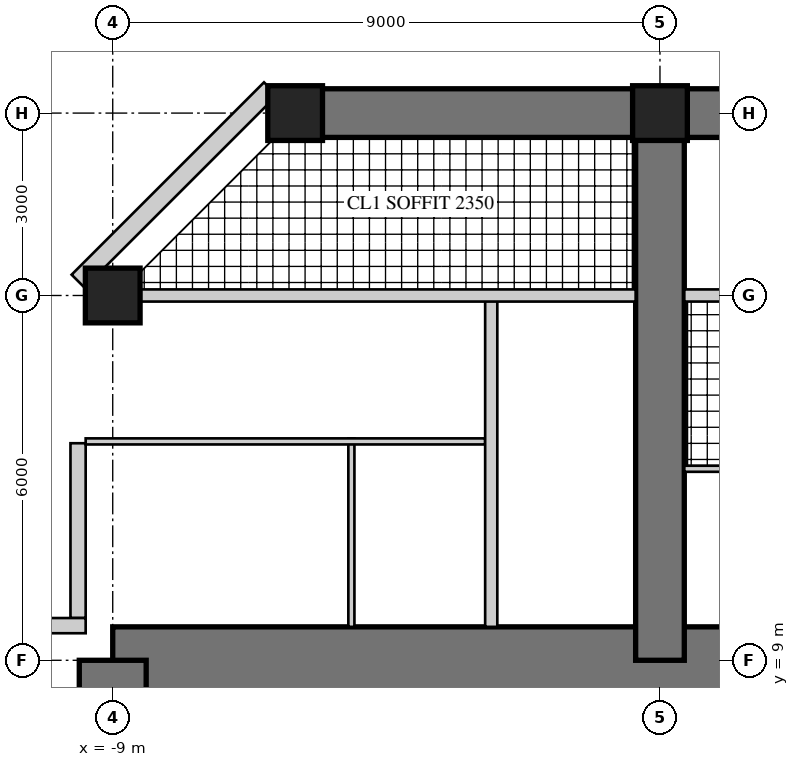
"""IFC4 building model, lengths in metres.
Left out: names, types, materials, properties, quantities, classifications, styles, units other than length and angle.
Written with IfcOpenShell. Run it as: python <this file> out.ifc"""

import sys

from ifc_helpers import new_model, si_unit, direction, frame, frame_2d, origin, origin_2d, place, context, subcontext, project, spatial, rectangle, hollow_rectangle, extrude, element, fill, save


model = new_model("IFC4")
c1 = context("Model", 3, precision=1e-05, world=origin(), true_north=direction((0.0, 1.0)))
c2 = subcontext(c1, "Body", "Model", "MODEL_VIEW")
j1 = project(units=[si_unit("LENGTHUNIT", "METRE"), si_unit("PLANEANGLEUNIT", "RADIAN")], contexts=[c1])
p1 = place(None, origin())
s1 = spatial("IfcSite", under=j1, at=p1, CompositionType="ELEMENT")
p2 = place(p1, origin())
s2 = spatial("IfcBuilding", under=s1, at=p2, CompositionType="ELEMENT")
p3 = place(p2, frame((0.0, 0.0, 206.9)))
s3 = spatial("IfcBuildingStorey", under=s2, at=p3, CompositionType="ELEMENT", Elevation=206.9)
p4 = place(p3, frame((9.0, 9.0, 0.0), z_axis=(0.0, 0.0, 1.0), x_axis=(-1.0, 0.0, 0.0)))
e1 = element("IfcWall", 1, at=p4, inside=s3, PredefinedType="SHEAR", context=c2, shape_type="SweptSolid", body=[
    extrude(rectangle(XDim=18.0, YDim=1.1, at=frame_2d((9.0, 0.0))), origin(), (0.0, 0.0, 1.0), 3.4),
])
p5 = place(p4, frame((9.8, 0.0, 0.0)))
e2 = element("IfcOpeningElement", 2, at=p5, cuts=e1, PredefinedType="OPENING", context=c2, shape_type="SweptSolid", body=[
    extrude(rectangle(XDim=1.0, YDim=2.4, at=frame_2d((0.5, 1.2))), frame((0.0, 0.56, 0.0), z_axis=(0.0, -1.0, 0.0), x_axis=(1.0, 0.0, 0.0)), (0.0, 0.0, 1.0), 1.12),
])
p6 = place(p3, frame((-9.0, 9.0, 0.0), z_axis=(0.0, 0.0, 1.0), x_axis=(0.0, -1.0, 0.0)))
e3 = element("IfcWall", 3, at=p6, inside=s3, PredefinedType="SHEAR", context=c2, shape_type="SweptSolid", body=[
    extrude(rectangle(XDim=18.0, YDim=1.1, at=frame_2d((9.0, 0.0))), origin(), (0.0, 0.0, 1.0), 3.4),
])
p7 = place(p6, frame((9.8, 0.0, 0.0)))
e4 = element("IfcOpeningElement", 4, at=p7, cuts=e3, PredefinedType="OPENING", context=c2, shape_type="SweptSolid", body=[
    extrude(rectangle(XDim=1.0, YDim=2.4, at=frame_2d((0.5, 1.2))), frame((0.0, 0.56, 0.0), z_axis=(0.0, -1.0, 0.0), x_axis=(1.0, 0.0, 0.0)), (0.0, 0.0, 1.0), 1.12),
])
p8 = place(p3, frame((0.0, 9.0, 0.0), z_axis=(0.0, 0.0, 1.0), x_axis=(0.0, 1.0, 0.0)))
e5 = element("IfcWall", 5, at=p8, inside=s3, PredefinedType="SHEAR", context=c2, shape_type="SweptSolid", body=[
    extrude(rectangle(XDim=9.0, YDim=0.8, at=frame_2d((4.5, 0.0))), origin(), (0.0, 0.0, 1.0), 3.4),
])
p9 = place(p8, frame((3.95, 0.0, 0.0)))
e6 = element("IfcOpeningElement", 6, at=p9, cuts=e5, PredefinedType="OPENING", context=c2, shape_type="SweptSolid", body=[
    extrude(rectangle(XDim=1.0, YDim=2.15, at=frame_2d((0.5, 1.075))), frame((0.0, 0.41, 0.0), z_axis=(0.0, -1.0, 0.0), x_axis=(1.0, 0.0, 0.0)), (0.0, 0.0, 1.0), 0.82),
])
p10 = place(p8, frame((7.0, 0.0, 0.0)))
e7 = element("IfcOpeningElement", 7, at=p10, cuts=e5, PredefinedType="OPENING", context=c2, shape_type="SweptSolid", body=[
    extrude(rectangle(XDim=1.0, YDim=2.2, at=frame_2d((0.5, 1.1))), frame((0.0, 0.41, 0.0), z_axis=(0.0, -1.0, 0.0), x_axis=(1.0, 0.0, 0.0)), (0.0, 0.0, 1.0), 0.82),
])
p11 = place(p3, frame((6.0, 18.0, 0.0), z_axis=(0.0, 0.0, 1.0), x_axis=(-1.0, 0.0, 0.0)))
e8 = element("IfcWall", 8, at=p11, inside=s3, PredefinedType="SHEAR", context=c2, shape_type="SweptSolid", body=[
    extrude(rectangle(XDim=12.0, YDim=0.8, at=frame_2d((6.0, 0.0))), origin(), (0.0, 0.0, 1.0), 3.4),
])
p12 = place(p11, frame((1.625, 0.0, 0.6)))
e9 = element("IfcOpeningElement", 9, at=p12, cuts=e8, PredefinedType="OPENING", context=c2, shape_type="SweptSolid", body=[
    extrude(rectangle(XDim=3.0, YDim=2.4, at=frame_2d((1.5, 1.2))), frame((0.0, 0.41, 0.0), z_axis=(0.0, -1.0, 0.0), x_axis=(1.0, 0.0, 0.0)), (0.0, 0.0, 1.0), 0.82),
])
p13 = place(p11, frame((7.375, 0.0, 0.6)))
e10 = element("IfcOpeningElement", 10, at=p13, cuts=e8, PredefinedType="OPENING", context=c2, shape_type="SweptSolid", body=[
    extrude(rectangle(XDim=3.0, YDim=2.4, at=frame_2d((1.5, 1.2))), frame((0.0, 0.41, 0.0), z_axis=(0.0, -1.0, 0.0), x_axis=(1.0, 0.0, 0.0)), (0.0, 0.0, 1.0), 0.82),
])
for number, where, z_axis, x_axis in (
    (11, (-9.0, 15.0, 0.0), (0.0, 0.0, 1.0), (1.0, 0.0, 0.0)),
    (12, (0.0, 18.0, 0.0), (0.0, 0.0, 1.0), (1.0, 0.0, 0.0)),
    (13, (-6.0, 18.0, 0.0), (0.0, 0.0, 1.0), (1.0, 0.0, 0.0)),
):
    element("IfcColumn", number, at=place(p3, frame(where, z_axis=z_axis, x_axis=x_axis)), inside=s3, PredefinedType="COLUMN", context=c2, shape_type="SweptSolid", body=[
        extrude(rectangle(XDim=0.9, YDim=0.9, at=origin_2d()), origin(), (0.0, 0.0, 1.0), 3.4),
    ])
p14 = place(p3, frame((-6.406, 18.4, 0.0), z_axis=(0.0, 0.0, 1.0), x_axis=(-0.707134062067, -0.707079499254, 0.0)))
e14 = element("IfcWall", 14, at=p14, inside=s3, PredefinedType="SOLIDWALL", context=c2, shape_type="SweptSolid", body=[
    extrude(rectangle(XDim=4.475, YDim=0.3, at=frame_2d((2.237, 0.0))), origin(), (0.0, 0.0, 1.0), 3.22),
])
p15 = place(p14, frame((1.787, 0.0, 0.3)))
e15 = element("IfcOpeningElement", 15, at=p15, cuts=e14, PredefinedType="OPENING", context=c2, shape_type="SweptSolid", body=[
    extrude(rectangle(XDim=0.9, YDim=2.4, at=frame_2d((0.45, 1.2))), frame((0.0, 0.16, 0.0), z_axis=(0.0, -1.0, 0.0), x_axis=(1.0, 0.0, 0.0)), (0.0, 0.0, 1.0), 0.32),
])
p16 = place(p3, frame((-9.57, 12.57, 0.0), z_axis=(0.0, 0.0, 1.0), x_axis=(0.0, -1.0, 0.0)))
e16 = element("IfcWall", 16, at=p16, inside=s3, PredefinedType="SOLIDWALL", context=c2, shape_type="SweptSolid", body=[
    extrude(rectangle(XDim=2.875, YDim=0.25, at=frame_2d((1.438, 0.0))), origin(), (0.0, 0.0, 1.0), 3.22),
])
p17 = place(p16, frame((0.6, 0.0, 0.0)))
e17 = element("IfcOpeningElement", 17, at=p17, cuts=e16, PredefinedType="OPENING", context=c2, shape_type="SweptSolid", body=[
    extrude(rectangle(XDim=1.0, YDim=2.2, at=frame_2d((0.5, 1.1))), frame((0.0, 0.135, 0.0), z_axis=(0.0, -1.0, 0.0), x_axis=(1.0, 0.0, 0.0)), (0.0, 0.0, 1.0), 0.27),
])
p18 = place(p3, frame((-9.445, 9.57, 0.0), z_axis=(0.0, 0.0, 1.0), x_axis=(-1.0, 0.0, 0.0)))
e18 = element("IfcWall", 18, at=p18, inside=s3, PredefinedType="SOLIDWALL", context=c2, shape_type="SweptSolid", body=[
    extrude(rectangle(XDim=3.125, YDim=0.25, at=frame_2d((1.562, 0.0))), origin(), (0.0, 0.0, 1.0), 3.22),
])
p19 = place(p18, frame((0.6, 0.0, 0.0)))
e19 = element("IfcOpeningElement", 19, at=p19, cuts=e18, PredefinedType="OPENING", context=c2, shape_type="SweptSolid", body=[
    extrude(rectangle(XDim=1.0, YDim=2.2, at=frame_2d((0.5, 1.1))), frame((0.0, 0.135, 0.0), z_axis=(0.0, -1.0, 0.0), x_axis=(1.0, 0.0, 0.0)), (0.0, 0.0, 1.0), 0.27),
])
p20 = place(p3, frame((-5.075, 9.55, 0.0), z_axis=(0.0, 0.0, 1.0), x_axis=(0.0, 1.0, 0.0)))
e20 = element("IfcWall", 20, at=p20, inside=s3, PredefinedType="PARTITIONING", context=c2, shape_type="SweptSolid", body=[
    extrude(rectangle(XDim=3.1, YDim=0.1, at=frame_2d((1.55, 0.0))), origin(), (0.0, 0.0, 1.0), 3.22),
])
p21 = place(p3, frame((-2.875, 12.6, 0.0), z_axis=(0.0, 0.0, 1.0), x_axis=(-1.0, 0.0, 0.0)))
e21 = element("IfcWall", 21, at=p21, inside=s3, PredefinedType="PARTITIONING", context=c2, shape_type="SweptSolid", body=[
    extrude(rectangle(XDim=6.57, YDim=0.1, at=frame_2d((3.285, 0.0))), origin(), (0.0, 0.0, 1.0), 3.22),
])
p22 = place(p21, frame((0.55, 0.0, 0.0)))
e22 = element("IfcOpeningElement", 22, at=p22, cuts=e21, PredefinedType="OPENING", context=c2, shape_type="SweptSolid", body=[
    extrude(rectangle(XDim=0.9, YDim=2.1, at=frame_2d((0.45, 1.05))), frame((0.0, 0.06, 0.0), z_axis=(0.0, -1.0, 0.0), x_axis=(1.0, 0.0, 0.0)), (0.0, 0.0, 1.0), 0.12),
])
p23 = place(p21, frame((2.65, 0.0, 0.0)))
e23 = element("IfcOpeningElement", 23, at=p23, cuts=e21, PredefinedType="OPENING", context=c2, shape_type="SweptSolid", body=[
    extrude(rectangle(XDim=0.9, YDim=2.1, at=frame_2d((0.45, 1.05))), frame((0.0, 0.06, 0.0), z_axis=(0.0, -1.0, 0.0), x_axis=(1.0, 0.0, 0.0)), (0.0, 0.0, 1.0), 0.12),
])
p24 = place(p3, frame((9.445, 12.15, 0.0), z_axis=(0.0, 0.0, 1.0), x_axis=(-1.0, 0.0, 0.0)))
e24 = element("IfcWall", 24, at=p24, inside=s3, PredefinedType="PARTITIONING", context=c2, shape_type="SweptSolid", body=[
    extrude(rectangle(XDim=9.045, YDim=0.1, at=frame_2d((4.522, 0.0))), origin(), (0.0, 0.0, 1.0), 3.22),
])
p25 = place(p24, frame((5.495, 0.0, 0.0)))
e25 = element("IfcOpeningElement", 25, at=p25, cuts=e24, PredefinedType="OPENING", context=c2, shape_type="SweptSolid", body=[
    extrude(rectangle(XDim=0.9, YDim=2.1, at=frame_2d((0.45, 1.05))), frame((0.0, 0.06, 0.0), z_axis=(0.0, -1.0, 0.0), x_axis=(1.0, 0.0, 0.0)), (0.0, 0.0, 1.0), 0.12),
])
p26 = place(p24, frame((7.595, 0.0, 0.0)))
e26 = element("IfcOpeningElement", 26, at=p26, cuts=e24, PredefinedType="OPENING", context=c2, shape_type="SweptSolid", body=[
    extrude(rectangle(XDim=0.9, YDim=2.1, at=frame_2d((0.45, 1.05))), frame((0.0, 0.06, 0.0), z_axis=(0.0, -1.0, 0.0), x_axis=(1.0, 0.0, 0.0)), (0.0, 0.0, 1.0), 0.12),
])
p27 = place(p3, frame((-2.775, 9.55, 0.0), z_axis=(0.0, 0.0, 1.0), x_axis=(0.0, 1.0, 0.0)))
e27 = element("IfcWall", 27, at=p27, inside=s3, PredefinedType="SOLIDWALL", context=c2, shape_type="SweptSolid", body=[
    extrude(rectangle(XDim=5.45, YDim=0.2, at=frame_2d((2.725, 0.0))), origin(), (0.0, 0.0, 1.0), 3.22),
])
p28 = place(p27, frame((3.6, 0.0, 0.0)))
e28 = element("IfcOpeningElement", 28, at=p28, cuts=e27, PredefinedType="OPENING", context=c2, shape_type="SweptSolid", body=[
    extrude(rectangle(XDim=1.0, YDim=2.15, at=frame_2d((0.5, 1.075))), frame((0.0, 0.11, 0.0), z_axis=(0.0, -1.0, 0.0), x_axis=(1.0, 0.0, 0.0)), (0.0, 0.0, 1.0), 0.22),
])
p29 = place(p3, frame((8.55, 15.0, 0.0), z_axis=(0.0, 0.0, 1.0), x_axis=(-1.0, 0.0, 0.0)))
e29 = element("IfcWall", 29, at=p29, inside=s3, PredefinedType="SOLIDWALL", context=c2, shape_type="SweptSolid", body=[
    extrude(rectangle(XDim=8.15, YDim=0.2, at=frame_2d((4.075, 0.0))), origin(), (0.0, 0.0, 1.0), 2.47),
])
p30 = place(p3, frame((-0.4, 15.0, 0.0), z_axis=(0.0, 0.0, 1.0), x_axis=(-1.0, 0.0, 0.0)))
e30 = element("IfcWall", 30, at=p30, inside=s3, PredefinedType="SOLIDWALL", context=c2, shape_type="SweptSolid", body=[
    extrude(rectangle(XDim=8.15, YDim=0.2, at=frame_2d((4.075, 0.0))), origin(), (0.0, 0.0, 1.0), 2.47),
])
p31 = place(p30, frame((0.4, 0.0, 0.0)))
e31 = element("IfcOpeningElement", 31, at=p31, cuts=e30, PredefinedType="OPENING", context=c2, shape_type="SweptSolid", body=[
    extrude(rectangle(XDim=1.0, YDim=2.2, at=frame_2d((0.5, 1.1))), frame((0.0, 0.11, 0.0), z_axis=(0.0, -1.0, 0.0), x_axis=(1.0, 0.0, 0.0)), (0.0, 0.0, 1.0), 0.22),
])
p32 = place(p13, origin())
e32 = element("IfcWindow", 32, at=p32, inside=s3, PartitioningType="SINGLE_PANEL", PredefinedType="WINDOW", context=c2, shape_type="SweptSolid", body=[
    extrude(hollow_rectangle(XDim=3.0, YDim=2.4, WallThickness=0.06, at=frame_2d((1.5, 1.2))), frame((0.0, 0.03, 0.0), z_axis=(0.0, -1.0, 0.0), x_axis=(1.0, 0.0, 0.0)), (0.0, 0.0, 1.0), 0.06),
    extrude(rectangle(XDim=2.879, YDim=2.279, at=frame_2d((1.5, 1.2))), frame((0.0, 0.03, 0.0), z_axis=(0.0, -1.0, 0.0), x_axis=(1.0, 0.0, 0.0)), (0.0, 0.0, 1.0), 0.06),
])
fill(e10, e32)
p33 = place(p15, origin())
e33 = element("IfcWindow", 33, at=p33, inside=s3, PartitioningType="SINGLE_PANEL", PredefinedType="WINDOW", context=c2, shape_type="SweptSolid", body=[
    extrude(hollow_rectangle(XDim=0.9, YDim=2.4, WallThickness=0.06, at=frame_2d((0.45, 1.2))), frame((0.0, 0.03, 0.0), z_axis=(0.0, -1.0, 0.0), x_axis=(1.0, 0.0, 0.0)), (0.0, 0.0, 1.0), 0.06),
    extrude(rectangle(XDim=0.779, YDim=2.279, at=frame_2d((0.45, 1.2))), frame((0.0, 0.03, 0.0), z_axis=(0.0, -1.0, 0.0), x_axis=(1.0, 0.0, 0.0)), (0.0, 0.0, 1.0), 0.06),
])
fill(e15, e33)
p34 = place(p17, origin())
e34 = element("IfcDoor", 34, at=p34, inside=s3, OperationType="SINGLE_SWING_LEFT", PredefinedType="DOOR", context=c2, shape_type="SweptSolid", body=[
    extrude(hollow_rectangle(XDim=1.0, YDim=2.2, WallThickness=0.06, at=frame_2d((0.5, 1.1))), frame((0.0, 0.025, 0.0), z_axis=(0.0, -1.0, 0.0), x_axis=(1.0, 0.0, 0.0)), (0.0, 0.0, 1.0), 0.05),
    extrude(rectangle(XDim=0.879, YDim=2.079, at=frame_2d((0.5, 1.1))), frame((0.0, 0.025, 0.0), z_axis=(0.0, -1.0, 0.0), x_axis=(1.0, 0.0, 0.0)), (0.0, 0.0, 1.0), 0.05),
])
fill(e17, e34)
p35 = place(p22, origin())
e35 = element("IfcDoor", 35, at=p35, inside=s3, OperationType="SINGLE_SWING_LEFT", PredefinedType="DOOR", context=c2, shape_type="SweptSolid", body=[
    extrude(rectangle(XDim=0.9, YDim=2.1, at=frame_2d((0.45, 1.05))), frame((0.0, 0.025, 0.0), z_axis=(0.0, -1.0, 0.0), x_axis=(1.0, 0.0, 0.0)), (0.0, 0.0, 1.0), 0.05),
])
fill(e22, e35)
p36 = place(p23, origin())
e36 = element("IfcDoor", 36, at=p36, inside=s3, OperationType="SINGLE_SWING_LEFT", PredefinedType="DOOR", context=c2, shape_type="SweptSolid", body=[
    extrude(rectangle(XDim=0.9, YDim=2.1, at=frame_2d((0.45, 1.05))), frame((0.0, 0.025, 0.0), z_axis=(0.0, -1.0, 0.0), x_axis=(1.0, 0.0, 0.0)), (0.0, 0.0, 1.0), 0.05),
])
fill(e23, e36)
p37 = place(p26, origin())
e37 = element("IfcDoor", 37, at=p37, inside=s3, OperationType="SINGLE_SWING_RIGHT", PredefinedType="DOOR", context=c2, shape_type="SweptSolid", body=[
    extrude(rectangle(XDim=0.9, YDim=2.1, at=frame_2d((0.45, 1.05))), frame((0.0, 0.025, 0.0), z_axis=(0.0, -1.0, 0.0), x_axis=(1.0, 0.0, 0.0)), (0.0, 0.0, 1.0), 0.05),
])
fill(e26, e37)
p38 = place(p28, origin())
e38 = element("IfcDoor", 38, at=p38, inside=s3, OperationType="SINGLE_SWING_LEFT", PredefinedType="DOOR", context=c2, shape_type="SweptSolid", body=[
    extrude(rectangle(XDim=1.0, YDim=2.15, at=frame_2d((0.5, 1.075))), frame((0.0, 0.025, 0.0), z_axis=(0.0, -1.0, 0.0), x_axis=(1.0, 0.0, 0.0)), (0.0, 0.0, 1.0), 0.05),
])
fill(e28, e38)
p39 = place(p31, frame((1.0, 0.0, 0.0), z_axis=(0.0, 0.0, 1.0), x_axis=(-1.0, 0.0, 0.0)))
e39 = element("IfcDoor", 39, at=p39, inside=s3, OperationType="SINGLE_SWING_RIGHT", PredefinedType="DOOR", context=c2, shape_type="SweptSolid", body=[
    extrude(rectangle(XDim=1.0, YDim=2.2, at=frame_2d((0.5, 1.1))), frame((0.0, 0.025, 0.0), z_axis=(0.0, -1.0, 0.0), x_axis=(1.0, 0.0, 0.0)), (0.0, 0.0, 1.0), 0.05),
])
fill(e31, e39)
p40 = place(p9, frame((1.0, 0.0, 0.0), z_axis=(0.0, 0.0, 1.0), x_axis=(-1.0, 0.0, 0.0)))
e40 = element("IfcDoor", 40, at=p40, inside=s3, OperationType="SINGLE_SWING_RIGHT", PredefinedType="DOOR", context=c2, shape_type="SweptSolid", body=[
    extrude(rectangle(XDim=1.0, YDim=2.15, at=frame_2d((0.5, 1.075))), frame((0.0, 0.025, 0.0), z_axis=(0.0, -1.0, 0.0), x_axis=(1.0, 0.0, 0.0)), (0.0, 0.0, 1.0), 0.05),
])
fill(e6, e40)
p41 = place(p10, frame((1.0, 0.0, 0.0), z_axis=(0.0, 0.0, 1.0), x_axis=(-1.0, 0.0, 0.0)))
e41 = element("IfcDoor", 41, at=p41, inside=s3, OperationType="SINGLE_SWING_LEFT", PredefinedType="DOOR", context=c2, shape_type="SweptSolid", body=[
    extrude(rectangle(XDim=1.0, YDim=2.2, at=frame_2d((0.5, 1.1))), frame((0.0, 0.025, 0.0), z_axis=(0.0, -1.0, 0.0), x_axis=(1.0, 0.0, 0.0)), (0.0, 0.0, 1.0), 0.05),
])
fill(e7, e41)
p42 = place(p5, origin())
e42 = element("IfcDoor", 42, at=p42, inside=s3, OperationType="SINGLE_SWING_RIGHT", PredefinedType="DOOR", context=c2, shape_type="SweptSolid", body=[
    extrude(rectangle(XDim=1.0, YDim=2.4, at=frame_2d((0.5, 1.2))), frame((0.0, 0.055, 0.0), z_axis=(0.0, -1.0, 0.0), x_axis=(1.0, 0.0, 0.0)), (0.0, 0.0, 1.0), 0.05),
])
fill(e2, e42)
save(model, sys.argv[1])
